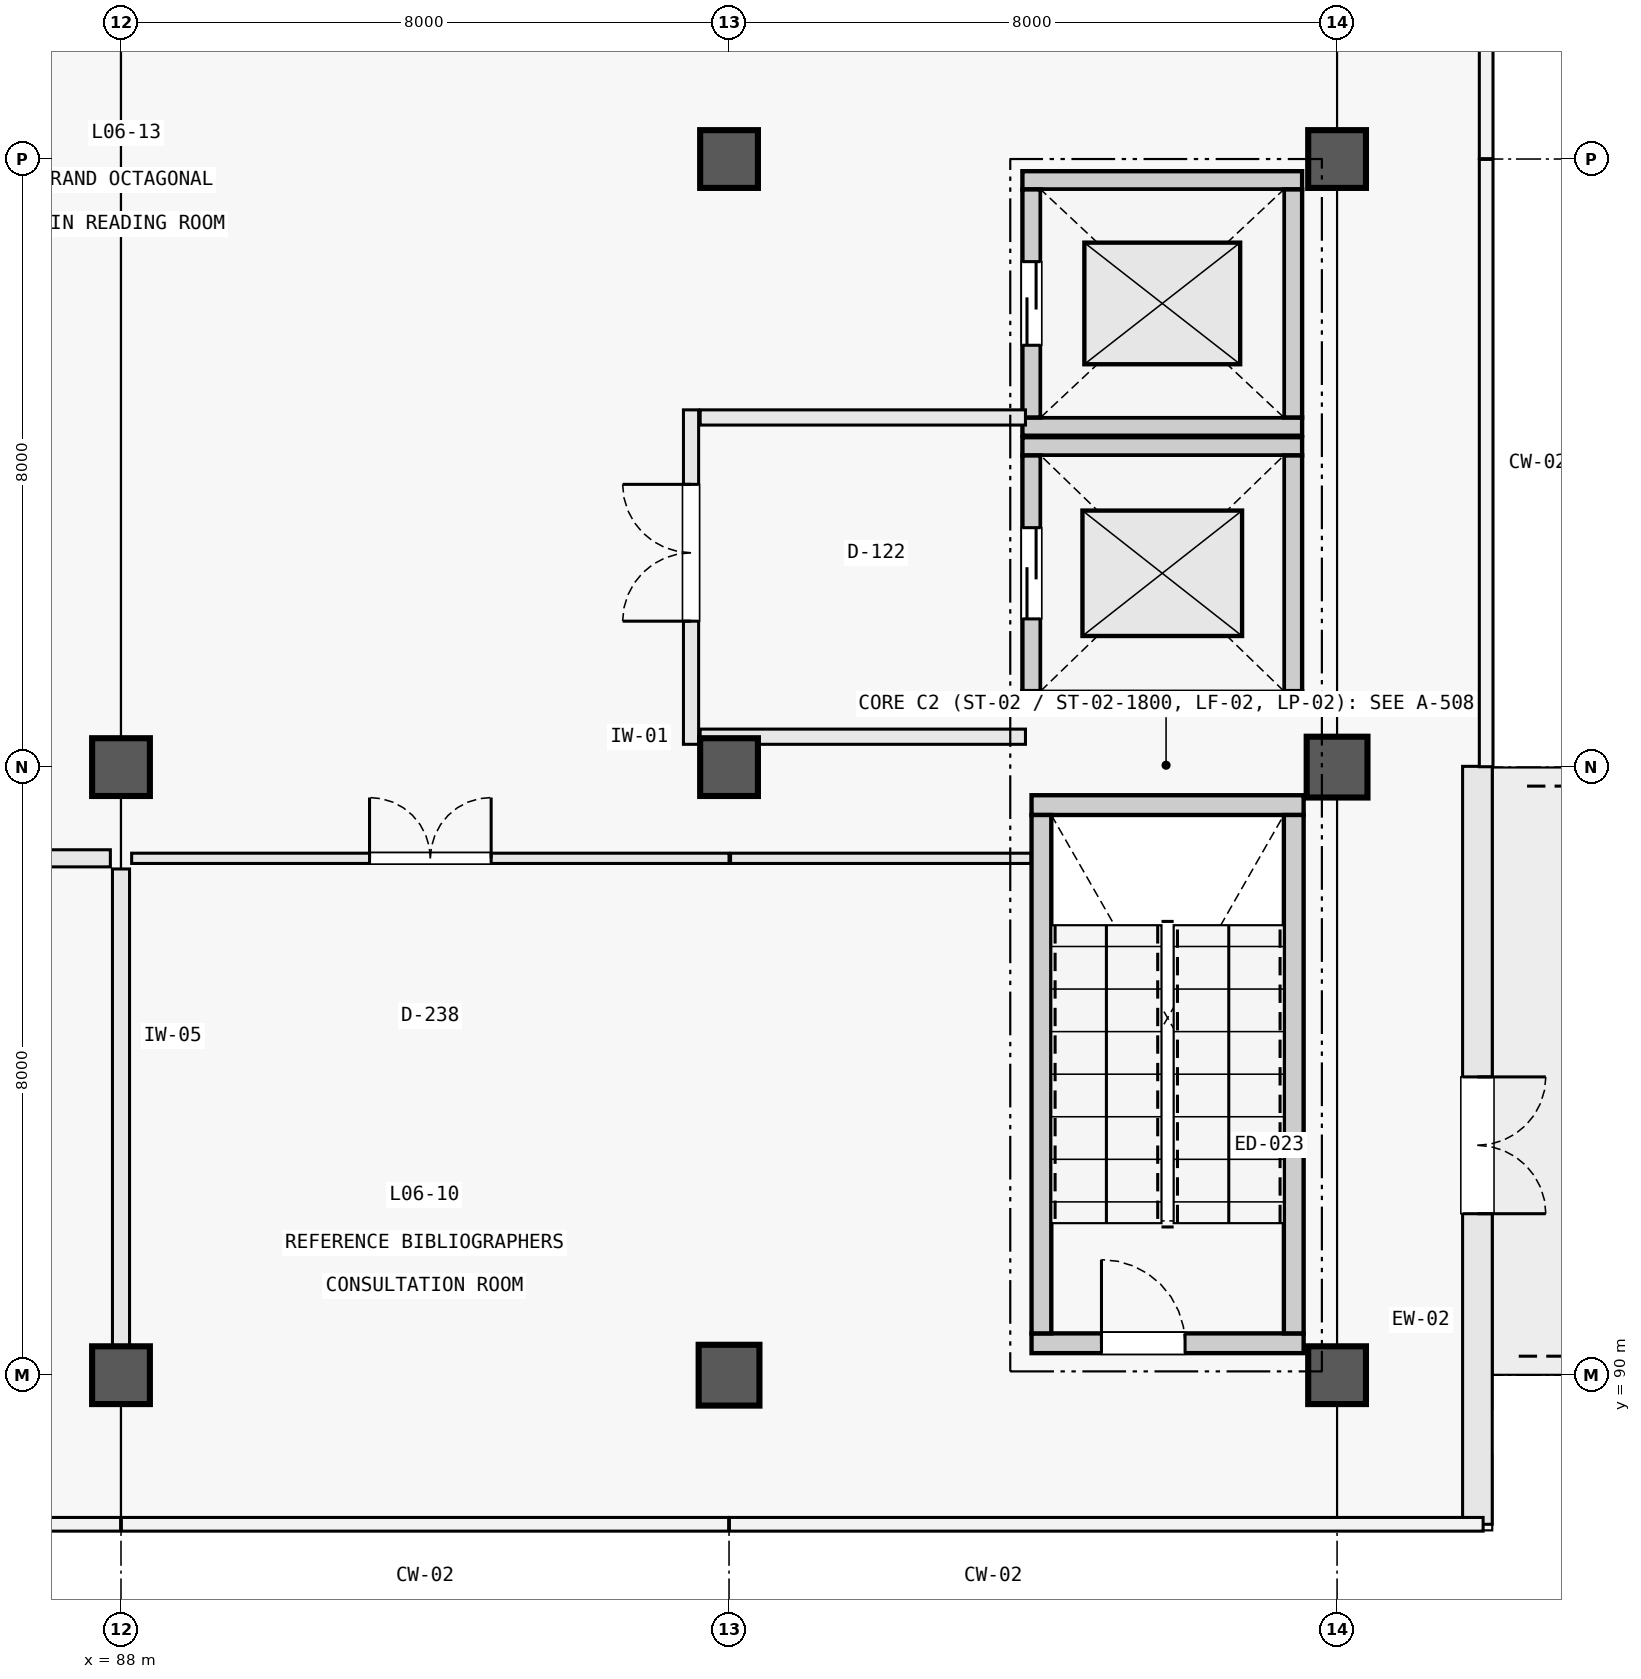
"""IFC4 building model, lengths in metres.
Left out: names, types, materials, properties, quantities, classifications, styles, units other than length and angle.
Written with IfcOpenShell. Run it as: python <this file> out.ifc"""

import sys

from ifc_helpers import new_model, si_unit, direction, frame, frame_2d, origin, origin_2d, place, context, subcontext, project, spatial, rectangle, circle, extrude, element, fill, save


model = new_model("IFC4")
c1 = context("Model", 3, precision=1e-05, world=origin(), true_north=direction((0.0, 1.0)))
c2 = subcontext(c1, "Body", "Model", "MODEL_VIEW")
j1 = project(units=[si_unit("LENGTHUNIT", "METRE"), si_unit("PLANEANGLEUNIT", "RADIAN")], contexts=[c1])
p1 = place(None, origin())
s1 = spatial("IfcSite", under=j1, at=p1, CompositionType="ELEMENT")
p2 = place(p1, origin())
s2 = spatial("IfcBuilding", under=s1, at=p2, CompositionType="ELEMENT")
p3 = place(p2, frame((0.0, 0.0, 24.9)))
s3 = spatial("IfcBuildingStorey", under=s2, at=p3, CompositionType="ELEMENT", Elevation=24.9)
for number, where, z_axis, x_axis in (
    (1, (88.0, 90.0, 0.0), (0.0, 0.0, 1.0), (1.0, 0.0, 0.0)),
    (2, (88.0, 98.0, 0.0), (0.0, 0.0, 1.0), (1.0, 0.0, 0.0)),
):
    element("IfcColumn", number, at=place(p3, frame(where, z_axis=z_axis, x_axis=x_axis)), inside=s3, PredefinedType="COLUMN", context=c2, shape_type="SweptSolid", body=[
        extrude(circle(Radius=0.38, at=origin_2d()), origin(), (0.0, 0.0, 1.0), 5.4),
    ])
p4 = place(p3, frame((96.0, 90.0, 0.0), z_axis=(0.0, 0.0, 1.0), x_axis=(1.0, 0.0, 0.0)))
e3 = element("IfcColumn", 3, at=p4, inside=s3, PredefinedType="COLUMN", context=c2, shape_type="SweptSolid", body=[
    extrude(rectangle(XDim=0.8, YDim=0.8, at=origin_2d()), origin(), (0.0, 0.0, 1.0), 5.4),
])
for number, where, z_axis, x_axis in (
    (4, (96.0, 98.0, 0.0), (0.0, 0.0, 1.0), (1.0, 0.0, 0.0)),
    (5, (96.0, 106.0, 0.0), (0.0, 0.0, 1.0), (1.0, 0.0, 0.0)),
    (6, (104.0, 90.0, 0.0), (0.0, 0.0, 1.0), (1.0, 0.0, 0.0)),
):
    element("IfcColumn", number, at=place(p3, frame(where, z_axis=z_axis, x_axis=x_axis)), inside=s3, PredefinedType="COLUMN", context=c2, shape_type="SweptSolid", body=[
        extrude(circle(Radius=0.38, at=origin_2d()), origin(), (0.0, 0.0, 1.0), 5.4),
    ])
p5 = place(p3, frame((104.0, 98.0, 0.0), z_axis=(0.0, 0.0, 1.0), x_axis=(1.0, 0.0, 0.0)))
e7 = element("IfcColumn", 7, at=p5, inside=s3, PredefinedType="COLUMN", context=c2, shape_type="SweptSolid", body=[
    extrude(rectangle(XDim=0.8, YDim=0.8, at=origin_2d()), origin(), (0.0, 0.0, 1.0), 5.4),
])
p6 = place(p3, frame((104.0, 106.0, 0.0), z_axis=(0.0, 0.0, 1.0), x_axis=(1.0, 0.0, 0.0)))
e8 = element("IfcColumn", 8, at=p6, inside=s3, PredefinedType="COLUMN", context=c2, shape_type="SweptSolid", body=[
    extrude(circle(Radius=0.38, at=origin_2d()), origin(), (0.0, 0.0, 1.0), 5.4),
])
p7 = place(p3, frame((105.846, 88.039, 0.0), z_axis=(0.0, 0.0, 1.0), x_axis=(0.0, 1.0, 0.0)))
e9 = element("IfcWall", 9, at=p7, inside=s3, PredefinedType="STANDARD", context=c2, shape_type="SweptSolid", body=[
    extrude(rectangle(XDim=9.971, YDim=0.39, at=frame_2d((4.986, 0.0))), origin(), (0.0, 0.0, 1.0), 3.46),
])
p8 = place(p7, frame((4.086, 0.0, 0.0)))
e10 = element("IfcOpeningElement", 10, at=p8, cuts=e9, PredefinedType="OPENING", context=c2, shape_type="SweptSolid", body=[
    extrude(rectangle(XDim=1.8, YDim=2.4, at=frame_2d((0.9, 1.2))), frame((0.0, 0.207, 0.0), z_axis=(0.0, -1.0, 0.0), x_axis=(1.0, 0.0, 0.0)), (0.0, 0.0, 1.0), 0.414),
])
p9 = place(p3, frame((99.98, 90.42, 0.0), z_axis=(0.0, 0.0, 1.0), x_axis=(1.0, 0.0, 0.0)))
e11 = element("IfcWall", 11, at=p9, inside=s3, PredefinedType="SOLIDWALL", context=c2, shape_type="SweptSolid", body=[
    extrude(rectangle(XDim=3.58, YDim=0.26, at=frame_2d((1.79, 0.0))), origin(), (0.0, 0.0, 1.0), 5.4),
])
p10 = place(p9, frame((0.92, 0.0, 0.0)))
e12 = element("IfcOpeningElement", 12, at=p10, cuts=e11, PredefinedType="OPENING", context=c2, shape_type="SweptSolid", body=[
    extrude(rectangle(XDim=1.1, YDim=2.2, at=frame_2d((0.55, 1.1))), frame((0.0, 0.142, 0.0), z_axis=(0.0, -1.0, 0.0), x_axis=(1.0, 0.0, 0.0)), (0.0, 0.0, 1.0), 0.284),
])
p11 = place(p3, frame((99.98, 97.5, 0.0), z_axis=(0.0, 0.0, 1.0), x_axis=(1.0, 0.0, 0.0)))
e13 = element("IfcWall", 13, at=p11, inside=s3, PredefinedType="SOLIDWALL", context=c2, shape_type="SweptSolid", body=[
    extrude(rectangle(XDim=3.58, YDim=0.26, at=frame_2d((1.79, 0.0))), origin(), (0.0, 0.0, 1.0), 5.4),
])
for number, where, z_axis, x_axis in (
    (14, (100.11, 90.55, 0.0), (0.0, 0.0, 1.0), (0.0, 1.0, 0.0)),
    (15, (103.43, 90.55, 0.0), (0.0, 0.0, 1.0), (0.0, 1.0, 0.0)),
):
    element("IfcWall", number, at=place(p3, frame(where, z_axis=z_axis, x_axis=x_axis)), inside=s3, PredefinedType="SOLIDWALL", context=c2, shape_type="SweptSolid", body=[
        extrude(rectangle(XDim=6.82, YDim=0.26, at=frame_2d((3.41, 0.0))), origin(), (0.0, 0.0, 1.0), 5.4),
    ])
for number, where, z_axis, x_axis in (
    (16, (99.86, 98.88, 0.0), (0.0, 0.0, 1.0), (1.0, 0.0, 0.0)),
    (17, (99.86, 102.22, 0.0), (0.0, 0.0, 1.0), (1.0, 0.0, 0.0)),
):
    element("IfcWall", number, at=place(p3, frame(where, z_axis=z_axis, x_axis=x_axis)), inside=s3, PredefinedType="SOLIDWALL", context=c2, shape_type="SweptSolid", body=[
        extrude(rectangle(XDim=3.68, YDim=0.24, at=frame_2d((1.84, 0.0))), origin(), (0.0, 0.0, 1.0), 5.4),
    ])
p12 = place(p3, frame((99.98, 99.0, 0.0), z_axis=(0.0, 0.0, 1.0), x_axis=(0.0, 1.0, 0.0)))
e18 = element("IfcWall", 18, at=p12, inside=s3, PredefinedType="SOLIDWALL", context=c2, shape_type="SweptSolid", body=[
    extrude(rectangle(XDim=3.1, YDim=0.24, at=frame_2d((1.55, 0.0))), origin(), (0.0, 0.0, 1.0), 5.4),
])
p13 = place(p12, frame((0.95, 0.0, 0.0)))
e19 = element("IfcOpeningElement", 19, at=p13, cuts=e18, PredefinedType="OPENING", context=c2, shape_type="SweptSolid", body=[
    extrude(rectangle(XDim=1.2, YDim=2.2, at=frame_2d((0.6, 1.1))), frame((0.0, 0.132, 0.0), z_axis=(0.0, -1.0, 0.0), x_axis=(1.0, 0.0, 0.0)), (0.0, 0.0, 1.0), 0.264),
])
p14 = place(p3, frame((103.42, 99.0, 0.0), z_axis=(0.0, 0.0, 1.0), x_axis=(0.0, 1.0, 0.0)))
e20 = element("IfcWall", 20, at=p14, inside=s3, PredefinedType="SOLIDWALL", context=c2, shape_type="SweptSolid", body=[
    extrude(rectangle(XDim=3.1, YDim=0.24, at=frame_2d((1.55, 0.0))), origin(), (0.0, 0.0, 1.0), 5.4),
])
for number, where, z_axis, x_axis in (
    (21, (99.86, 102.48, 0.0), (0.0, 0.0, 1.0), (1.0, 0.0, 0.0)),
    (22, (99.86, 105.72, 0.0), (0.0, 0.0, 1.0), (1.0, 0.0, 0.0)),
):
    element("IfcWall", number, at=place(p3, frame(where, z_axis=z_axis, x_axis=x_axis)), inside=s3, PredefinedType="SOLIDWALL", context=c2, shape_type="SweptSolid", body=[
        extrude(rectangle(XDim=3.68, YDim=0.24, at=frame_2d((1.84, 0.0))), origin(), (0.0, 0.0, 1.0), 5.4),
    ])
p15 = place(p3, frame((99.98, 102.6, 0.0), z_axis=(0.0, 0.0, 1.0), x_axis=(0.0, 1.0, 0.0)))
e23 = element("IfcWall", 23, at=p15, inside=s3, PredefinedType="SOLIDWALL", context=c2, shape_type="SweptSolid", body=[
    extrude(rectangle(XDim=3.0, YDim=0.24, at=frame_2d((1.5, 0.0))), origin(), (0.0, 0.0, 1.0), 5.4),
])
p16 = place(p15, frame((0.95, 0.0, 0.0)))
e24 = element("IfcOpeningElement", 24, at=p16, cuts=e23, PredefinedType="OPENING", context=c2, shape_type="SweptSolid", body=[
    extrude(rectangle(XDim=1.1, YDim=2.2, at=frame_2d((0.55, 1.1))), frame((0.0, 0.132, 0.0), z_axis=(0.0, -1.0, 0.0), x_axis=(1.0, 0.0, 0.0)), (0.0, 0.0, 1.0), 0.264),
])
p17 = place(p3, frame((103.42, 102.6, 0.0), z_axis=(0.0, 0.0, 1.0), x_axis=(0.0, 1.0, 0.0)))
e25 = element("IfcWall", 25, at=p17, inside=s3, PredefinedType="SOLIDWALL", context=c2, shape_type="SweptSolid", body=[
    extrude(rectangle(XDim=3.0, YDim=0.24, at=frame_2d((1.5, 0.0))), origin(), (0.0, 0.0, 1.0), 5.4),
])
for number, where, z_axis, x_axis in (
    (26, (95.62, 98.4, 0.0), (0.0, 0.0, 1.0), (1.0, 0.0, 0.0)),
    (27, (95.62, 102.6, 0.0), (0.0, 0.0, 1.0), (1.0, 0.0, 0.0)),
):
    element("IfcWall", number, at=place(p3, frame(where, z_axis=z_axis, x_axis=x_axis)), inside=s3, PredefinedType="PARTITIONING", context=c2, shape_type="SweptSolid", body=[
        extrude(rectangle(XDim=4.28, YDim=0.2, at=frame_2d((2.14, 0.0))), origin(), (0.0, 0.0, 1.0), 4.16),
    ])
p18 = place(p3, frame((95.5, 98.3, 0.0), z_axis=(0.0, 0.0, 1.0), x_axis=(0.0, 1.0, 0.0)))
e28 = element("IfcWall", 28, at=p18, inside=s3, PredefinedType="PARTITIONING", context=c2, shape_type="SweptSolid", body=[
    extrude(rectangle(XDim=4.4, YDim=0.2, at=frame_2d((2.2, 0.0))), origin(), (0.0, 0.0, 1.0), 4.16),
])
p19 = place(p18, frame((1.62, 0.0, 0.0)))
e29 = element("IfcOpeningElement", 29, at=p19, cuts=e28, PredefinedType="OPENING", context=c2, shape_type="SweptSolid", body=[
    extrude(rectangle(XDim=1.8, YDim=2.25, at=frame_2d((0.9, 1.125))), frame((0.0, 0.112, 0.0), z_axis=(0.0, -1.0, 0.0), x_axis=(1.0, 0.0, 0.0)), (0.0, 0.0, 1.0), 0.224),
])
p20 = place(p3, frame((88.0, 90.39, 0.0), z_axis=(0.0, 0.0, 1.0), x_axis=(0.0, 1.0, 0.0)))
e30 = element("IfcWall", 30, at=p20, inside=s3, PredefinedType="PARTITIONING", context=c2, shape_type="SweptSolid", body=[
    extrude(rectangle(XDim=6.27, YDim=0.225, at=frame_2d((3.135, 0.0))), origin(), (0.0, 0.0, 1.0), 3.99),
])
p21 = place(p3, frame((80.14, 96.8, 0.0), z_axis=(0.0, 0.0, 1.0), x_axis=(1.0, 0.0, 0.0)))
e31 = element("IfcWall", 31, at=p21, inside=s3, PredefinedType="PARTITIONING", context=c2, shape_type="SweptSolid", body=[
    extrude(rectangle(XDim=7.72, YDim=0.225, at=frame_2d((3.86, 0.0))), origin(), (0.0, 0.0, 1.0), 3.99),
])
p22 = place(p21, frame((2.113, 0.0, 0.0)))
e32 = element("IfcOpeningElement", 32, at=p22, cuts=e31, PredefinedType="OPENING", context=c2, shape_type="SweptSolid", body=[
    extrude(rectangle(XDim=0.92, YDim=2.1, at=frame_2d((0.46, 1.05))), frame((0.0, 0.125, 0.0), z_axis=(0.0, -1.0, 0.0), x_axis=(1.0, 0.0, 0.0)), (0.0, 0.0, 1.0), 0.249),
])
p23 = place(p21, frame((4.687, 0.0, 0.0)))
e33 = element("IfcOpeningElement", 33, at=p23, cuts=e31, PredefinedType="OPENING", context=c2, shape_type="SweptSolid", body=[
    extrude(rectangle(XDim=0.92, YDim=2.1, at=frame_2d((0.46, 1.05))), frame((0.0, 0.125, 0.0), z_axis=(0.0, -1.0, 0.0), x_axis=(1.0, 0.0, 0.0)), (0.0, 0.0, 1.0), 0.249),
])
p24 = place(p3, frame((88.14, 96.8, 0.0), z_axis=(0.0, 0.0, 1.0), x_axis=(1.0, 0.0, 0.0)))
e34 = element("IfcWall", 34, at=p24, inside=s3, PredefinedType="PARTITIONING", context=c2, shape_type="SweptSolid", body=[
    extrude(rectangle(XDim=7.86, YDim=0.135, at=frame_2d((3.93, 0.0))), origin(), (0.0, 0.0, 1.0), 3.99),
])
p25 = place(p24, frame((3.13, 0.0, 0.0)))
e35 = element("IfcOpeningElement", 35, at=p25, cuts=e34, PredefinedType="OPENING", context=c2, shape_type="SweptSolid", body=[
    extrude(rectangle(XDim=1.6, YDim=2.2, at=frame_2d((0.8, 1.1))), frame((0.0, 0.08, 0.0), z_axis=(0.0, -1.0, 0.0), x_axis=(1.0, 0.0, 0.0)), (0.0, 0.0, 1.0), 0.159),
])
p26 = place(p3, frame((96.02, 96.8, 0.0), z_axis=(0.0, 0.0, 1.0), x_axis=(1.0, 0.0, 0.0)))
e36 = element("IfcWall", 36, at=p26, inside=s3, PredefinedType="PARTITIONING", context=c2, shape_type="SweptSolid", body=[
    extrude(rectangle(XDim=3.95, YDim=0.135, at=frame_2d((1.975, 0.0))), origin(), (0.0, 0.0, 1.0), 3.99),
])
p27 = place(p8, frame((1.8, 0.0, 0.0), z_axis=(0.0, 0.0, 1.0), x_axis=(-1.0, 0.0, 0.0)))
e37 = element("IfcDoor", 37, at=p27, inside=s3, OperationType="DOUBLE_DOOR_SINGLE_SWING", PredefinedType="DOOR", context=c2, shape_type="SweptSolid", body=[
    extrude(rectangle(XDim=1.8, YDim=2.4, at=frame_2d((0.9, 1.2))), frame((0.0, 0.025, 0.0), z_axis=(0.0, -1.0, 0.0), x_axis=(1.0, 0.0, 0.0)), (0.0, 0.0, 1.0), 0.05),
])
fill(e10, e37)
p28 = place(p10, origin())
e38 = element("IfcDoor", 38, at=p28, inside=s3, OperationType="SINGLE_SWING_LEFT", PredefinedType="DOOR", context=c2, shape_type="SweptSolid", body=[
    extrude(rectangle(XDim=1.1, YDim=2.2, at=frame_2d((0.55, 1.1))), frame((0.0, 0.025, 0.0), z_axis=(0.0, -1.0, 0.0), x_axis=(1.0, 0.0, 0.0)), (0.0, 0.0, 1.0), 0.05),
])
fill(e12, e38)
p29 = place(p13, origin())
e39 = element("IfcDoor", 39, at=p29, inside=s3, OperationType="DOUBLE_DOOR_SLIDING", PredefinedType="DOOR", context=c2, shape_type="SweptSolid", body=[
    extrude(rectangle(XDim=1.2, YDim=2.2, at=frame_2d((0.6, 1.1))), frame((0.0, 0.025, 0.0), z_axis=(0.0, -1.0, 0.0), x_axis=(1.0, 0.0, 0.0)), (0.0, 0.0, 1.0), 0.05),
])
fill(e19, e39)
p30 = place(p16, origin())
e40 = element("IfcDoor", 40, at=p30, inside=s3, OperationType="DOUBLE_DOOR_SLIDING", PredefinedType="DOOR", context=c2, shape_type="SweptSolid", body=[
    extrude(rectangle(XDim=1.1, YDim=2.2, at=frame_2d((0.55, 1.1))), frame((0.0, 0.025, 0.0), z_axis=(0.0, -1.0, 0.0), x_axis=(1.0, 0.0, 0.0)), (0.0, 0.0, 1.0), 0.05),
])
fill(e24, e40)
p31 = place(p19, origin())
e41 = element("IfcDoor", 41, at=p31, inside=s3, OperationType="DOUBLE_DOOR_SINGLE_SWING", PredefinedType="DOOR", context=c2, shape_type="SweptSolid", body=[
    extrude(rectangle(XDim=1.8, YDim=2.25, at=frame_2d((0.9, 1.125))), frame((0.0, 0.025, 0.0), z_axis=(0.0, -1.0, 0.0), x_axis=(1.0, 0.0, 0.0)), (0.0, 0.0, 1.0), 0.05),
])
fill(e29, e41)
p32 = place(p25, origin())
e42 = element("IfcDoor", 42, at=p32, inside=s3, OperationType="DOUBLE_DOOR_SINGLE_SWING", PredefinedType="DOOR", context=c2, shape_type="SweptSolid", body=[
    extrude(rectangle(XDim=1.6, YDim=2.2, at=frame_2d((0.8, 1.1))), frame((0.0, 0.025, 0.0), z_axis=(0.0, -1.0, 0.0), x_axis=(1.0, 0.0, 0.0)), (0.0, 0.0, 1.0), 0.05),
])
fill(e35, e42)
save(model, sys.argv[1])
